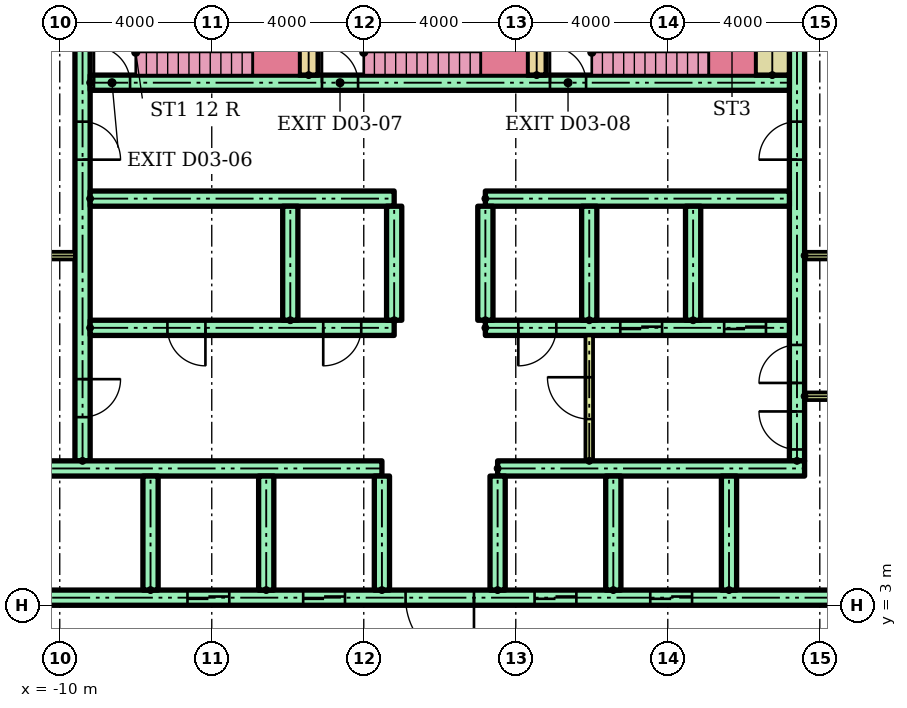
"""IFC4 building model, lengths in metres.
Left out: names, types, materials, properties, quantities, classifications, styles, units other than length and angle.
Written with IfcOpenShell. Run it as: python <this file> out.ifc"""

import sys

from ifc_helpers import new_model, si_unit, direction, frame, frame_2d, origin, place, context, subcontext, project, spatial, rectangle, extrude, element, fill, save


model = new_model("IFC4")
c1 = context("Model", 3, precision=1e-05, world=origin(), true_north=direction((0.0, 1.0)))
c2 = subcontext(c1, "Body", "Model", "MODEL_VIEW")
j1 = project(units=[si_unit("LENGTHUNIT", "METRE"), si_unit("PLANEANGLEUNIT", "RADIAN")], contexts=[c1])
p1 = place(None, origin())
s1 = spatial("IfcSite", under=j1, at=p1, CompositionType="ELEMENT")
p2 = place(p1, origin())
s2 = spatial("IfcBuilding", under=s1, at=p2, CompositionType="ELEMENT")
p3 = place(p2, frame((0.0, 0.0, 14.0)))
s3 = spatial("IfcBuildingStorey", under=s2, at=p3, CompositionType="ELEMENT", Elevation=14.0)
p4 = place(p3, frame((-9.4, 6.8, 0.0), z_axis=(0.0, 0.0, 1.0), x_axis=(0.0, 1.0, 0.0)))
e1 = element("IfcWall", 1, at=p4, inside=s3, PredefinedType="SHEAR", context=c2, shape_type="SweptSolid", body=[
    extrude(rectangle(XDim=12.7, YDim=0.4, at=frame_2d((6.35, 0.0))), origin(), (0.0, 0.0, 1.0), 3.7),
])
p5 = place(p4, frame((1.15, 0.0, 0.0)))
e2 = element("IfcOpeningElement", 2, at=p5, cuts=e1, PredefinedType="OPENING", context=c2, shape_type="SweptSolid", body=[
    extrude(rectangle(XDim=1.0, YDim=2.1, at=frame_2d((0.5, 1.05))), frame((0.0, 0.21, 0.0), z_axis=(0.0, -1.0, 0.0), x_axis=(1.0, 0.0, 0.0)), (0.0, 0.0, 1.0), 0.42),
])
p6 = place(p4, frame((7.925, 0.0, 0.0)))
e3 = element("IfcOpeningElement", 3, at=p6, cuts=e1, PredefinedType="OPENING", context=c2, shape_type="SweptSolid", body=[
    extrude(rectangle(XDim=1.0, YDim=2.1, at=frame_2d((0.5, 1.05))), frame((0.0, 0.21, 0.0), z_axis=(0.0, -1.0, 0.0), x_axis=(1.0, 0.0, 0.0)), (0.0, 0.0, 1.0), 0.42),
])
p7 = place(p3, frame((9.4, 6.8, 0.0), z_axis=(0.0, 0.0, 1.0), x_axis=(0.0, 1.0, 0.0)))
e4 = element("IfcWall", 4, at=p7, inside=s3, PredefinedType="SHEAR", context=c2, shape_type="SweptSolid", body=[
    extrude(rectangle(XDim=12.7, YDim=0.4, at=frame_2d((6.35, 0.0))), origin(), (0.0, 0.0, 1.0), 3.7),
])
p8 = place(p7, frame((0.3, 0.0, 0.0)))
e5 = element("IfcOpeningElement", 5, at=p8, cuts=e4, PredefinedType="OPENING", context=c2, shape_type="SweptSolid", body=[
    extrude(rectangle(XDim=1.0, YDim=2.1, at=frame_2d((0.5, 1.05))), frame((0.0, 0.21, 0.0), z_axis=(0.0, -1.0, 0.0), x_axis=(1.0, 0.0, 0.0)), (0.0, 0.0, 1.0), 0.42),
])
p9 = place(p7, frame((2.05, 0.0, 0.0)))
e6 = element("IfcOpeningElement", 6, at=p9, cuts=e4, PredefinedType="OPENING", context=c2, shape_type="SweptSolid", body=[
    extrude(rectangle(XDim=1.0, YDim=2.1, at=frame_2d((0.5, 1.05))), frame((0.0, 0.21, 0.0), z_axis=(0.0, -1.0, 0.0), x_axis=(1.0, 0.0, 0.0)), (0.0, 0.0, 1.0), 0.42),
])
p10 = place(p7, frame((7.925, 0.0, 0.0)))
e7 = element("IfcOpeningElement", 7, at=p10, cuts=e4, PredefinedType="OPENING", context=c2, shape_type="SweptSolid", body=[
    extrude(rectangle(XDim=1.0, YDim=2.1, at=frame_2d((0.5, 1.05))), frame((0.0, 0.21, 0.0), z_axis=(0.0, -1.0, 0.0), x_axis=(1.0, 0.0, 0.0)), (0.0, 0.0, 1.0), 0.42),
])
p11 = place(p3, frame((-13.5, 3.2, 0.0)))
e8 = element("IfcWall", 8, at=p11, inside=s3, PredefinedType="SHEAR", context=c2, shape_type="SweptSolid", body=[
    extrude(rectangle(XDim=27.0, YDim=0.4, at=frame_2d((13.5, 0.0))), origin(), (0.0, 0.0, 1.0), 3.7),
])
p12 = place(p11, frame((6.861, 0.0, 0.0)))
e9 = element("IfcOpeningElement", 9, at=p12, cuts=e8, PredefinedType="OPENING", context=c2, shape_type="SweptSolid", body=[
    extrude(rectangle(XDim=1.1, YDim=2.1, at=frame_2d((0.55, 1.05))), frame((0.0, 0.21, 0.0), z_axis=(0.0, -1.0, 0.0), x_axis=(1.0, 0.0, 0.0)), (0.0, 0.0, 1.0), 0.42),
])
p13 = place(p11, frame((9.906, 0.0, 0.0)))
e10 = element("IfcOpeningElement", 10, at=p13, cuts=e8, PredefinedType="OPENING", context=c2, shape_type="SweptSolid", body=[
    extrude(rectangle(XDim=1.1, YDim=2.1, at=frame_2d((0.55, 1.05))), frame((0.0, 0.21, 0.0), z_axis=(0.0, -1.0, 0.0), x_axis=(1.0, 0.0, 0.0)), (0.0, 0.0, 1.0), 0.42),
])
p14 = place(p11, frame((15.994, 0.0, 0.0)))
e11 = element("IfcOpeningElement", 11, at=p14, cuts=e8, PredefinedType="OPENING", context=c2, shape_type="SweptSolid", body=[
    extrude(rectangle(XDim=1.1, YDim=2.1, at=frame_2d((0.55, 1.05))), frame((0.0, 0.21, 0.0), z_axis=(0.0, -1.0, 0.0), x_axis=(1.0, 0.0, 0.0)), (0.0, 0.0, 1.0), 0.42),
])
p15 = place(p11, frame((19.039, 0.0, 0.0)))
e12 = element("IfcOpeningElement", 12, at=p15, cuts=e8, PredefinedType="OPENING", context=c2, shape_type="SweptSolid", body=[
    extrude(rectangle(XDim=1.1, YDim=2.1, at=frame_2d((0.55, 1.05))), frame((0.0, 0.21, 0.0), z_axis=(0.0, -1.0, 0.0), x_axis=(1.0, 0.0, 0.0)), (0.0, 0.0, 1.0), 0.42),
])
p16 = place(p11, frame((12.6, 0.0, 0.0)))
e13 = element("IfcOpeningElement", 13, at=p16, cuts=e8, PredefinedType="OPENING", context=c2, shape_type="SweptSolid", body=[
    extrude(rectangle(XDim=1.8, YDim=2.1, at=frame_2d((0.9, 1.05))), frame((0.0, 0.21, 0.0), z_axis=(0.0, -1.0, 0.0), x_axis=(1.0, 0.0, 0.0)), (0.0, 0.0, 1.0), 0.42),
])
p17 = place(p3, frame((-13.5, 6.6, 0.0)))
e14 = element("IfcWall", 14, at=p17, inside=s3, PredefinedType="SHEAR", context=c2, shape_type="SweptSolid", body=[
    extrude(rectangle(XDim=11.978, YDim=0.4, at=frame_2d((5.989, 0.0))), origin(), (0.0, 0.0, 1.0), 3.7),
])
p18 = place(p3, frame((1.522, 6.6, 0.0)))
e15 = element("IfcWall", 15, at=p18, inside=s3, PredefinedType="SHEAR", context=c2, shape_type="SweptSolid", body=[
    extrude(rectangle(XDim=8.078, YDim=0.4, at=frame_2d((4.039, 0.0))), origin(), (0.0, 0.0, 1.0), 3.7),
])
for number, where, z_axis, x_axis in (
    (16, (-7.611, 3.4, 0.0), (0.0, 0.0, 1.0), (0.0, 1.0, 0.0)),
    (17, (-4.567, 3.4, 0.0), (0.0, 0.0, 1.0), (0.0, 1.0, 0.0)),
    (18, (-1.522, 3.4, 0.0), (0.0, 0.0, 1.0), (0.0, 1.0, 0.0)),
    (19, (1.522, 3.4, 0.0), (0.0, 0.0, 1.0), (0.0, 1.0, 0.0)),
    (20, (4.567, 3.4, 0.0), (0.0, 0.0, 1.0), (0.0, 1.0, 0.0)),
    (21, (7.611, 3.4, 0.0), (0.0, 0.0, 1.0), (0.0, 1.0, 0.0)),
):
    element("IfcWall", number, at=place(p3, frame(where, z_axis=z_axis, x_axis=x_axis)), inside=s3, PredefinedType="SHEAR", context=c2, shape_type="SweptSolid", body=[
        extrude(rectangle(XDim=3.0, YDim=0.4, at=frame_2d((1.5, 0.0))), origin(), (0.0, 0.0, 1.0), 3.7),
    ])
p19 = place(p3, frame((-9.2, 10.3, 0.0)))
e22 = element("IfcWall", 22, at=p19, inside=s3, PredefinedType="SHEAR", context=c2, shape_type="SweptSolid", body=[
    extrude(rectangle(XDim=8.0, YDim=0.4, at=frame_2d((4.0, 0.0))), origin(), (0.0, 0.0, 1.0), 3.7),
])
p20 = place(p19, frame((2.033, 0.0, 0.0)))
e23 = element("IfcOpeningElement", 23, at=p20, cuts=e22, PredefinedType="OPENING", context=c2, shape_type="SweptSolid", body=[
    extrude(rectangle(XDim=1.0, YDim=2.1, at=frame_2d((0.5, 1.05))), frame((0.0, 0.21, 0.0), z_axis=(0.0, -1.0, 0.0), x_axis=(1.0, 0.0, 0.0)), (0.0, 0.0, 1.0), 0.42),
])
p21 = place(p19, frame((6.133, 0.0, 0.0)))
e24 = element("IfcOpeningElement", 24, at=p21, cuts=e22, PredefinedType="OPENING", context=c2, shape_type="SweptSolid", body=[
    extrude(rectangle(XDim=1.0, YDim=2.1, at=frame_2d((0.5, 1.05))), frame((0.0, 0.21, 0.0), z_axis=(0.0, -1.0, 0.0), x_axis=(1.0, 0.0, 0.0)), (0.0, 0.0, 1.0), 0.42),
])
p22 = place(p3, frame((-9.2, 13.7, 0.0)))
e25 = element("IfcWall", 25, at=p22, inside=s3, PredefinedType="SHEAR", context=c2, shape_type="SweptSolid", body=[
    extrude(rectangle(XDim=8.0, YDim=0.4, at=frame_2d((4.0, 0.0))), origin(), (0.0, 0.0, 1.0), 3.7),
])
p23 = place(p3, frame((1.2, 10.3, 0.0)))
e26 = element("IfcWall", 26, at=p23, inside=s3, PredefinedType="SHEAR", context=c2, shape_type="SweptSolid", body=[
    extrude(rectangle(XDim=8.0, YDim=0.4, at=frame_2d((4.0, 0.0))), origin(), (0.0, 0.0, 1.0), 3.7),
])
p24 = place(p23, frame((3.55, 0.0, 0.0)))
e27 = element("IfcOpeningElement", 27, at=p24, cuts=e26, PredefinedType="OPENING", context=c2, shape_type="SweptSolid", body=[
    extrude(rectangle(XDim=1.1, YDim=2.1, at=frame_2d((0.55, 1.05))), frame((0.0, 0.21, 0.0), z_axis=(0.0, -1.0, 0.0), x_axis=(1.0, 0.0, 0.0)), (0.0, 0.0, 1.0), 0.42),
])
p25 = place(p23, frame((6.283, 0.0, 0.0)))
e28 = element("IfcOpeningElement", 28, at=p25, cuts=e26, PredefinedType="OPENING", context=c2, shape_type="SweptSolid", body=[
    extrude(rectangle(XDim=1.1, YDim=2.1, at=frame_2d((0.55, 1.05))), frame((0.0, 0.21, 0.0), z_axis=(0.0, -1.0, 0.0), x_axis=(1.0, 0.0, 0.0)), (0.0, 0.0, 1.0), 0.42),
])
p26 = place(p23, frame((0.867, 0.0, 0.0)))
e29 = element("IfcOpeningElement", 29, at=p26, cuts=e26, PredefinedType="OPENING", context=c2, shape_type="SweptSolid", body=[
    extrude(rectangle(XDim=1.0, YDim=2.1, at=frame_2d((0.5, 1.05))), frame((0.0, 0.21, 0.0), z_axis=(0.0, -1.0, 0.0), x_axis=(1.0, 0.0, 0.0)), (0.0, 0.0, 1.0), 0.42),
])
p27 = place(p3, frame((1.2, 13.7, 0.0)))
e30 = element("IfcWall", 30, at=p27, inside=s3, PredefinedType="SHEAR", context=c2, shape_type="SweptSolid", body=[
    extrude(rectangle(XDim=8.0, YDim=0.4, at=frame_2d((4.0, 0.0))), origin(), (0.0, 0.0, 1.0), 3.7),
])
for number, where, z_axis, x_axis in (
    (31, (-3.933, 10.5, 0.0), (0.0, 0.0, 1.0), (0.0, 1.0, 0.0)),
    (32, (-1.2, 10.5, 0.0), (0.0, 0.0, 1.0), (0.0, 1.0, 0.0)),
    (33, (1.2, 10.5, 0.0), (0.0, 0.0, 1.0), (0.0, 1.0, 0.0)),
    (34, (3.933, 10.5, 0.0), (0.0, 0.0, 1.0), (0.0, 1.0, 0.0)),
    (35, (6.667, 10.5, 0.0), (0.0, 0.0, 1.0), (0.0, 1.0, 0.0)),
):
    element("IfcWall", number, at=place(p3, frame(where, z_axis=z_axis, x_axis=x_axis)), inside=s3, PredefinedType="SHEAR", context=c2, shape_type="SweptSolid", body=[
        extrude(rectangle(XDim=3.0, YDim=0.4, at=frame_2d((1.5, 0.0))), origin(), (0.0, 0.0, 1.0), 3.7),
    ])
p28 = place(p3, frame((3.933, 6.8, 0.0), z_axis=(0.0, 0.0, 1.0), x_axis=(0.0, 1.0, 0.0)))
e36 = element("IfcWall", 36, at=p28, inside=s3, PredefinedType="PARTITIONING", context=c2, shape_type="SweptSolid", body=[
    extrude(rectangle(XDim=3.3, YDim=0.2, at=frame_2d((1.65, 0.0))), origin(), (0.0, 0.0, 1.0), 3.7),
])
p29 = place(p28, frame((1.1, 0.0, 0.0)))
e37 = element("IfcOpeningElement", 37, at=p29, cuts=e36, PredefinedType="OPENING", context=c2, shape_type="SweptSolid", body=[
    extrude(rectangle(XDim=1.1, YDim=2.1, at=frame_2d((0.55, 1.05))), frame((0.0, 0.11, 0.0), z_axis=(0.0, -1.0, 0.0), x_axis=(1.0, 0.0, 0.0)), (0.0, 0.0, 1.0), 0.22),
])
p30 = place(p3, frame((-9.2, 16.75, 0.0)))
e38 = element("IfcWall", 38, at=p30, inside=s3, PredefinedType="SHEAR", context=c2, shape_type="SweptSolid", body=[
    extrude(rectangle(XDim=18.4, YDim=0.4, at=frame_2d((9.2, 0.0))), origin(), (0.0, 0.0, 1.0), 3.7),
])
p31 = place(p30, frame((0.1, 0.0, 0.0)))
e39 = element("IfcOpeningElement", 39, at=p31, cuts=e38, PredefinedType="OPENING", context=c2, shape_type="SweptSolid", body=[
    extrude(rectangle(XDim=0.95, YDim=2.1, at=frame_2d((0.475, 1.05))), frame((0.0, 0.21, 0.0), z_axis=(0.0, -1.0, 0.0), x_axis=(1.0, 0.0, 0.0)), (0.0, 0.0, 1.0), 0.42),
])
p32 = place(p30, frame((6.1, 0.0, 0.0)))
e40 = element("IfcOpeningElement", 40, at=p32, cuts=e38, PredefinedType="OPENING", context=c2, shape_type="SweptSolid", body=[
    extrude(rectangle(XDim=0.95, YDim=2.1, at=frame_2d((0.475, 1.05))), frame((0.0, 0.21, 0.0), z_axis=(0.0, -1.0, 0.0), x_axis=(1.0, 0.0, 0.0)), (0.0, 0.0, 1.0), 0.42),
])
p33 = place(p30, frame((12.1, 0.0, 0.0)))
e41 = element("IfcOpeningElement", 41, at=p33, cuts=e38, PredefinedType="OPENING", context=c2, shape_type="SweptSolid", body=[
    extrude(rectangle(XDim=0.95, YDim=2.1, at=frame_2d((0.475, 1.05))), frame((0.0, 0.21, 0.0), z_axis=(0.0, -1.0, 0.0), x_axis=(1.0, 0.0, 0.0)), (0.0, 0.0, 1.0), 0.42),
])
for number, where, z_axis, x_axis in (
    (42, (-3.45, 16.95, 0.0), (0.0, 0.0, 1.0), (0.0, 1.0, 0.0)),
    (43, (2.55, 16.95, 0.0), (0.0, 0.0, 1.0), (0.0, 1.0, 0.0)),
):
    element("IfcWall", number, at=place(p3, frame(where, z_axis=z_axis, x_axis=x_axis)), inside=s3, PredefinedType="SHEAR", context=c2, shape_type="SweptSolid", body=[
        extrude(rectangle(XDim=2.55, YDim=0.5, at=frame_2d((1.275, 0.0))), origin(), (0.0, 0.0, 1.0), 3.7),
    ])
p34 = place(p3, frame((8.75, 16.95, 0.0), z_axis=(0.0, 0.0, 1.0), x_axis=(0.0, 1.0, 0.0)))
e44 = element("IfcWall", 44, at=p34, inside=s3, PredefinedType="SHEAR", context=c2, shape_type="SweptSolid", body=[
    extrude(rectangle(XDim=2.55, YDim=0.9, at=frame_2d((1.275, 0.0))), origin(), (0.0, 0.0, 1.0), 3.7),
])
for number, where in (
    (45, (-13.5, 12.2, 0.0)),
    (46, (9.6, 8.5, 0.0)),
    (47, (9.6, 12.2, 0.0)),
):
    element("IfcWall", number, at=place(p3, frame(where)), inside=s3, PredefinedType="PARTITIONING", context=c2, shape_type="SweptSolid", body=[
        extrude(rectangle(XDim=3.9, YDim=0.2, at=frame_2d((1.95, 0.0))), origin(), (0.0, 0.0, 1.0), 3.7),
    ])
p35 = place(p12, origin())
e48 = element("IfcDoor", 48, at=p35, inside=s3, OperationType="SLIDING_TO_LEFT", PredefinedType="DOOR", context=c2, shape_type="SweptSolid", body=[
    extrude(rectangle(XDim=1.1, YDim=2.1, at=frame_2d((0.55, 1.05))), frame((0.0, 0.025, 0.0), z_axis=(0.0, -1.0, 0.0), x_axis=(1.0, 0.0, 0.0)), (0.0, 0.0, 1.0), 0.05),
])
fill(e9, e48)
p36 = place(p13, origin())
e49 = element("IfcDoor", 49, at=p36, inside=s3, OperationType="SLIDING_TO_LEFT", PredefinedType="DOOR", context=c2, shape_type="SweptSolid", body=[
    extrude(rectangle(XDim=1.1, YDim=2.1, at=frame_2d((0.55, 1.05))), frame((0.0, 0.025, 0.0), z_axis=(0.0, -1.0, 0.0), x_axis=(1.0, 0.0, 0.0)), (0.0, 0.0, 1.0), 0.05),
])
fill(e10, e49)
p37 = place(p14, origin())
e50 = element("IfcDoor", 50, at=p37, inside=s3, OperationType="SLIDING_TO_LEFT", PredefinedType="DOOR", context=c2, shape_type="SweptSolid", body=[
    extrude(rectangle(XDim=1.1, YDim=2.1, at=frame_2d((0.55, 1.05))), frame((0.0, 0.025, 0.0), z_axis=(0.0, -1.0, 0.0), x_axis=(1.0, 0.0, 0.0)), (0.0, 0.0, 1.0), 0.05),
])
fill(e11, e50)
p38 = place(p15, origin())
e51 = element("IfcDoor", 51, at=p38, inside=s3, OperationType="SLIDING_TO_LEFT", PredefinedType="DOOR", context=c2, shape_type="SweptSolid", body=[
    extrude(rectangle(XDim=1.1, YDim=2.1, at=frame_2d((0.55, 1.05))), frame((0.0, 0.025, 0.0), z_axis=(0.0, -1.0, 0.0), x_axis=(1.0, 0.0, 0.0)), (0.0, 0.0, 1.0), 0.05),
])
fill(e12, e51)
p39 = place(p16, frame((1.8, 0.0, 0.0), z_axis=(0.0, 0.0, 1.0), x_axis=(-1.0, 0.0, 0.0)))
e52 = element("IfcDoor", 52, at=p39, inside=s3, OperationType="DOUBLE_DOOR_SINGLE_SWING", PredefinedType="DOOR", context=c2, shape_type="SweptSolid", body=[
    extrude(rectangle(XDim=1.8, YDim=2.1, at=frame_2d((0.9, 1.05))), frame((0.0, 0.025, 0.0), z_axis=(0.0, -1.0, 0.0), x_axis=(1.0, 0.0, 0.0)), (0.0, 0.0, 1.0), 0.05),
])
fill(e13, e52)
p40 = place(p24, origin())
e53 = element("IfcDoor", 53, at=p40, inside=s3, OperationType="SLIDING_TO_LEFT", PredefinedType="DOOR", context=c2, shape_type="SweptSolid", body=[
    extrude(rectangle(XDim=1.1, YDim=2.1, at=frame_2d((0.55, 1.05))), frame((0.0, 0.025, 0.0), z_axis=(0.0, -1.0, 0.0), x_axis=(1.0, 0.0, 0.0)), (0.0, 0.0, 1.0), 0.05),
])
fill(e27, e53)
p41 = place(p25, origin())
e54 = element("IfcDoor", 54, at=p41, inside=s3, OperationType="SLIDING_TO_LEFT", PredefinedType="DOOR", context=c2, shape_type="SweptSolid", body=[
    extrude(rectangle(XDim=1.1, YDim=2.1, at=frame_2d((0.55, 1.05))), frame((0.0, 0.025, 0.0), z_axis=(0.0, -1.0, 0.0), x_axis=(1.0, 0.0, 0.0)), (0.0, 0.0, 1.0), 0.05),
])
fill(e28, e54)
p42 = place(p20, frame((1.0, 0.0, 0.0), z_axis=(0.0, 0.0, 1.0), x_axis=(-1.0, 0.0, 0.0)))
e55 = element("IfcDoor", 55, at=p42, inside=s3, OperationType="SINGLE_SWING_RIGHT", PredefinedType="DOOR", context=c2, shape_type="SweptSolid", body=[
    extrude(rectangle(XDim=1.0, YDim=2.1, at=frame_2d((0.5, 1.05))), frame((0.0, 0.025, 0.0), z_axis=(0.0, -1.0, 0.0), x_axis=(1.0, 0.0, 0.0)), (0.0, 0.0, 1.0), 0.05),
])
fill(e23, e55)
p43 = place(p21, frame((1.0, 0.0, 0.0), z_axis=(0.0, 0.0, 1.0), x_axis=(-1.0, 0.0, 0.0)))
e56 = element("IfcDoor", 56, at=p43, inside=s3, OperationType="SINGLE_SWING_LEFT", PredefinedType="DOOR", context=c2, shape_type="SweptSolid", body=[
    extrude(rectangle(XDim=1.0, YDim=2.1, at=frame_2d((0.5, 1.05))), frame((0.0, 0.025, 0.0), z_axis=(0.0, -1.0, 0.0), x_axis=(1.0, 0.0, 0.0)), (0.0, 0.0, 1.0), 0.05),
])
fill(e24, e56)
p44 = place(p26, frame((1.0, 0.0, 0.0), z_axis=(0.0, 0.0, 1.0), x_axis=(-1.0, 0.0, 0.0)))
e57 = element("IfcDoor", 57, at=p44, inside=s3, OperationType="SINGLE_SWING_LEFT", PredefinedType="DOOR", context=c2, shape_type="SweptSolid", body=[
    extrude(rectangle(XDim=1.0, YDim=2.1, at=frame_2d((0.5, 1.05))), frame((0.0, 0.025, 0.0), z_axis=(0.0, -1.0, 0.0), x_axis=(1.0, 0.0, 0.0)), (0.0, 0.0, 1.0), 0.05),
])
fill(e29, e57)
p45 = place(p29, origin())
e58 = element("IfcDoor", 58, at=p45, inside=s3, OperationType="SINGLE_SWING_RIGHT", PredefinedType="DOOR", context=c2, shape_type="SweptSolid", body=[
    extrude(rectangle(XDim=1.1, YDim=2.1, at=frame_2d((0.55, 1.05))), frame((0.0, 0.025, 0.0), z_axis=(0.0, -1.0, 0.0), x_axis=(1.0, 0.0, 0.0)), (0.0, 0.0, 1.0), 0.05),
])
fill(e37, e58)
p46 = place(p31, origin())
e59 = element("IfcDoor", 59, at=p46, inside=s3, OperationType="SINGLE_SWING_LEFT", PredefinedType="DOOR", context=c2, shape_type="SweptSolid", body=[
    extrude(rectangle(XDim=0.95, YDim=2.1, at=frame_2d((0.475, 1.05))), frame((0.0, 0.025, 0.0), z_axis=(0.0, -1.0, 0.0), x_axis=(1.0, 0.0, 0.0)), (0.0, 0.0, 1.0), 0.05),
])
fill(e39, e59)
p47 = place(p32, origin())
e60 = element("IfcDoor", 60, at=p47, inside=s3, OperationType="SINGLE_SWING_LEFT", PredefinedType="DOOR", context=c2, shape_type="SweptSolid", body=[
    extrude(rectangle(XDim=0.95, YDim=2.1, at=frame_2d((0.475, 1.05))), frame((0.0, 0.025, 0.0), z_axis=(0.0, -1.0, 0.0), x_axis=(1.0, 0.0, 0.0)), (0.0, 0.0, 1.0), 0.05),
])
fill(e40, e60)
p48 = place(p33, origin())
e61 = element("IfcDoor", 61, at=p48, inside=s3, OperationType="SINGLE_SWING_LEFT", PredefinedType="DOOR", context=c2, shape_type="SweptSolid", body=[
    extrude(rectangle(XDim=0.95, YDim=2.1, at=frame_2d((0.475, 1.05))), frame((0.0, 0.025, 0.0), z_axis=(0.0, -1.0, 0.0), x_axis=(1.0, 0.0, 0.0)), (0.0, 0.0, 1.0), 0.05),
])
fill(e41, e61)
p49 = place(p5, frame((1.0, 0.0, 0.0), z_axis=(0.0, 0.0, 1.0), x_axis=(-1.0, 0.0, 0.0)))
e62 = element("IfcDoor", 62, at=p49, inside=s3, OperationType="SINGLE_SWING_RIGHT", PredefinedType="DOOR", context=c2, shape_type="SweptSolid", body=[
    extrude(rectangle(XDim=1.0, YDim=2.1, at=frame_2d((0.5, 1.05))), frame((0.0, 0.025, 0.0), z_axis=(0.0, -1.0, 0.0), x_axis=(1.0, 0.0, 0.0)), (0.0, 0.0, 1.0), 0.05),
])
fill(e2, e62)
p50 = place(p6, frame((1.0, 0.0, 0.0), z_axis=(0.0, 0.0, 1.0), x_axis=(-1.0, 0.0, 0.0)))
e63 = element("IfcDoor", 63, at=p50, inside=s3, OperationType="SINGLE_SWING_LEFT", PredefinedType="DOOR", context=c2, shape_type="SweptSolid", body=[
    extrude(rectangle(XDim=1.0, YDim=2.1, at=frame_2d((0.5, 1.05))), frame((0.0, 0.025, 0.0), z_axis=(0.0, -1.0, 0.0), x_axis=(1.0, 0.0, 0.0)), (0.0, 0.0, 1.0), 0.05),
])
fill(e3, e63)
p51 = place(p8, origin())
e64 = element("IfcDoor", 64, at=p51, inside=s3, OperationType="SINGLE_SWING_RIGHT", PredefinedType="DOOR", context=c2, shape_type="SweptSolid", body=[
    extrude(rectangle(XDim=1.0, YDim=2.1, at=frame_2d((0.5, 1.05))), frame((0.0, 0.025, 0.0), z_axis=(0.0, -1.0, 0.0), x_axis=(1.0, 0.0, 0.0)), (0.0, 0.0, 1.0), 0.05),
])
fill(e5, e64)
p52 = place(p9, origin())
e65 = element("IfcDoor", 65, at=p52, inside=s3, OperationType="SINGLE_SWING_LEFT", PredefinedType="DOOR", context=c2, shape_type="SweptSolid", body=[
    extrude(rectangle(XDim=1.0, YDim=2.1, at=frame_2d((0.5, 1.05))), frame((0.0, 0.025, 0.0), z_axis=(0.0, -1.0, 0.0), x_axis=(1.0, 0.0, 0.0)), (0.0, 0.0, 1.0), 0.05),
])
fill(e6, e65)
p53 = place(p10, origin())
e66 = element("IfcDoor", 66, at=p53, inside=s3, OperationType="SINGLE_SWING_LEFT", PredefinedType="DOOR", context=c2, shape_type="SweptSolid", body=[
    extrude(rectangle(XDim=1.0, YDim=2.1, at=frame_2d((0.5, 1.05))), frame((0.0, 0.025, 0.0), z_axis=(0.0, -1.0, 0.0), x_axis=(1.0, 0.0, 0.0)), (0.0, 0.0, 1.0), 0.05),
])
fill(e7, e66)
save(model, sys.argv[1])
